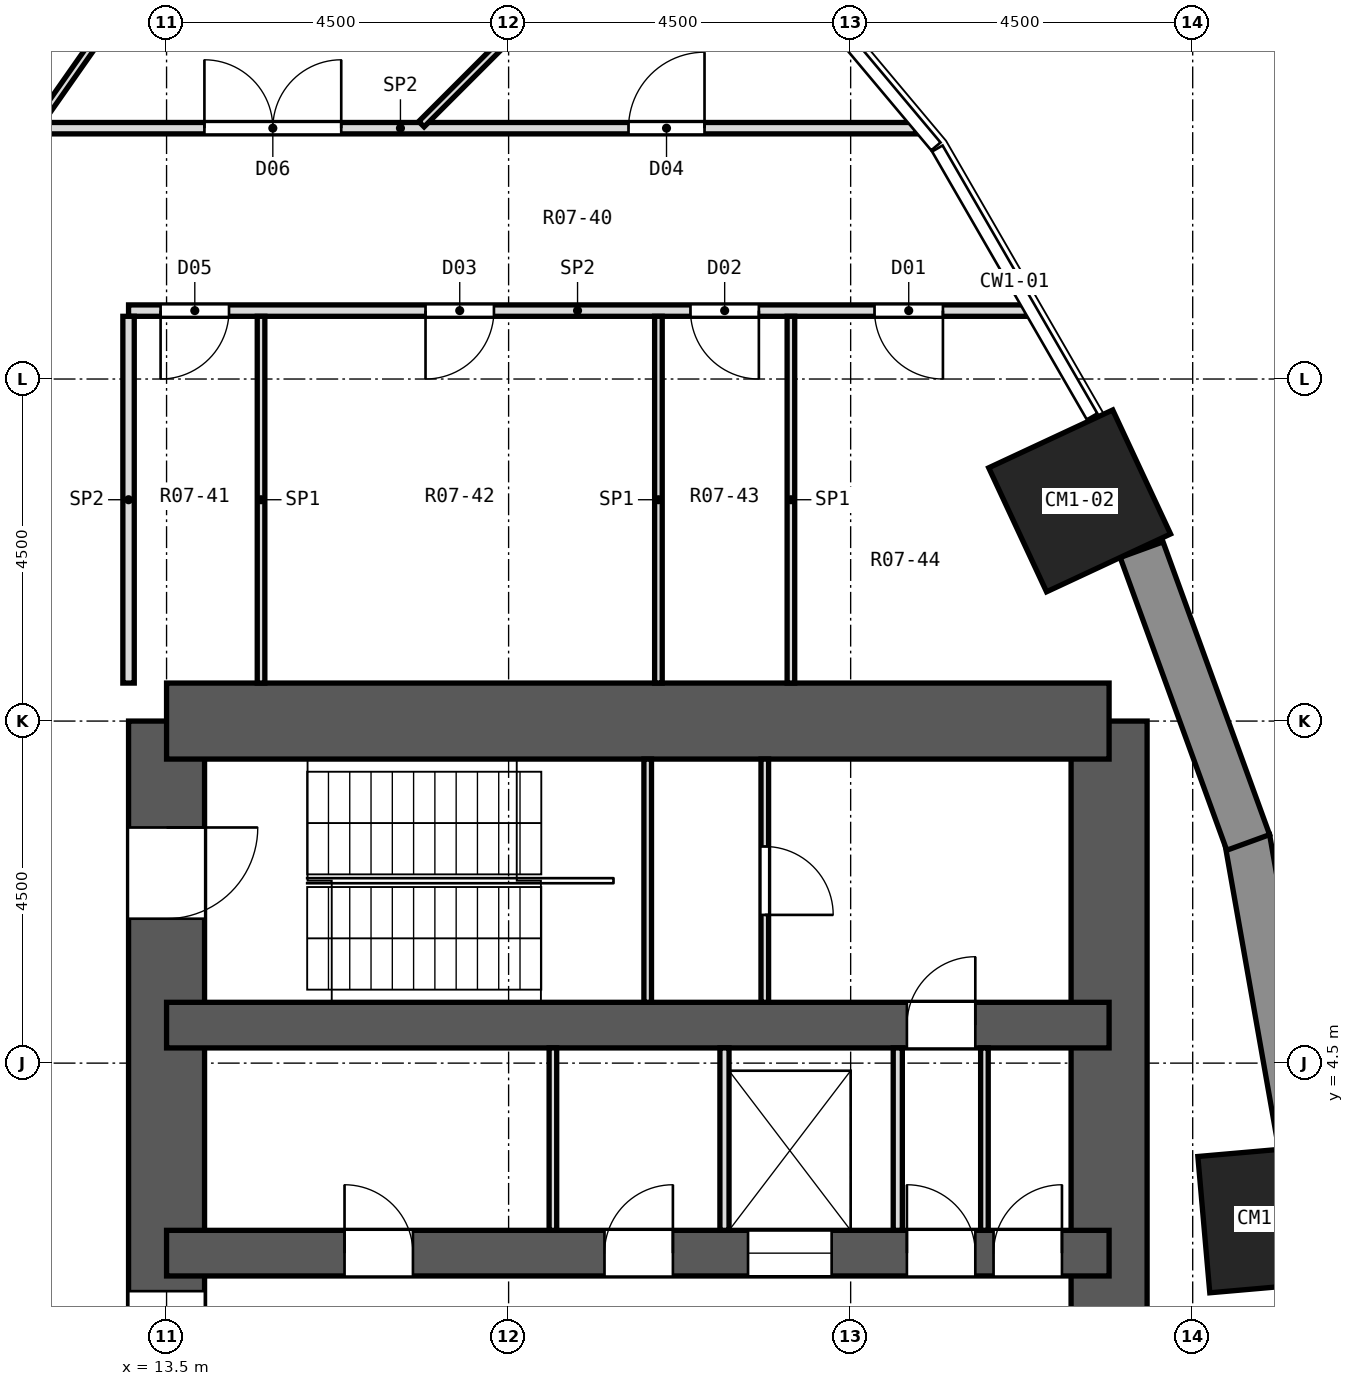
"""IFC4 building model, lengths in metres.
Left out: names, types, materials, properties, quantities, classifications, styles, units other than length and angle.
Written with IfcOpenShell. Run it as: python <this file> out.ifc"""

import sys

from ifc_helpers import new_model, si_unit, direction, frame, frame_2d, origin, origin_2d, place, context, subcontext, project, spatial, rectangle, extrude, element, fill, save


model = new_model("IFC4")
c1 = context("Model", 3, precision=1e-05, world=origin(), true_north=direction((0.0, 1.0)))
c2 = subcontext(c1, "Body", "Model", "MODEL_VIEW")
j1 = project(units=[si_unit("LENGTHUNIT", "METRE"), si_unit("PLANEANGLEUNIT", "RADIAN")], contexts=[c1])
p1 = place(None, origin())
s1 = spatial("IfcSite", under=j1, at=p1, CompositionType="ELEMENT")
p2 = place(p1, origin())
s2 = spatial("IfcBuilding", under=s1, at=p2, CompositionType="ELEMENT")
p3 = place(p2, frame((0.0, 0.0, 17.6)))
s3 = spatial("IfcBuildingStorey", under=s2, at=p3, CompositionType="ELEMENT", Elevation=17.6)
for number, where, z_axis, x_axis in (
    (1, (28.043, 2.453, 0.0), (0.0, 0.0, 1.0), (0.996, 0.087, 0.0)),
    (2, (25.512, 11.897, 0.0), (0.0, 0.0, 1.0), (0.906, 0.423, 0.0)),
):
    element("IfcColumn", number, at=place(p3, frame(where, z_axis=z_axis, x_axis=x_axis)), inside=s3, PredefinedType="COLUMN", context=c2, shape_type="SweptSolid", body=[
        extrude(rectangle(XDim=1.8, YDim=1.8, at=origin_2d()), origin(), (0.0, 0.0, 1.0), 4.2),
    ])
p4 = place(p3, frame((13.5, -9.0, 0.0), z_axis=(0.0, 0.0, 1.0), x_axis=(0.0, 1.0, 0.0)))
e3 = element("IfcWall", 3, at=p4, inside=s3, PredefinedType="SHEAR", context=c2, shape_type="SweptSolid", body=[
    extrude(rectangle(XDim=18.0, YDim=1.0, at=frame_2d((9.0, 0.0))), origin(), (0.0, 0.0, 1.0), 4.2),
])
p5 = place(p4, frame((15.4, 0.0, 0.0)))
e4 = element("IfcOpeningElement", 4, at=p5, cuts=e3, PredefinedType="OPENING", context=c2, shape_type="SweptSolid", body=[
    extrude(rectangle(XDim=1.2, YDim=2.1, at=frame_2d((0.6, 1.05))), frame((0.0, 0.512, 0.0), z_axis=(0.0, -1.0, 0.0), x_axis=(1.0, 0.0, 0.0)), (0.0, 0.0, 1.0), 1.024),
])
p6 = place(p4, frame((1.4, 0.0, 0.0)))
e5 = element("IfcOpeningElement", 5, at=p6, cuts=e3, PredefinedType="OPENING", context=c2, shape_type="SweptSolid", body=[
    extrude(rectangle(XDim=1.2, YDim=2.1, at=frame_2d((0.6, 1.05))), frame((0.0, 0.512, 0.0), z_axis=(0.0, -1.0, 0.0), x_axis=(1.0, 0.0, 0.0)), (0.0, 0.0, 1.0), 1.024),
])
p7 = place(p4, frame((7.5, 0.0, 0.0)))
e6 = element("IfcOpeningElement", 6, at=p7, cuts=e3, PredefinedType="OPENING", context=c2, shape_type="SweptSolid", body=[
    extrude(rectangle(XDim=3.0, YDim=2.4, at=frame_2d((1.5, 1.2))), frame((0.0, 0.512, 0.0), z_axis=(0.0, -1.0, 0.0), x_axis=(1.0, 0.0, 0.0)), (0.0, 0.0, 1.0), 1.024),
])
p8 = place(p3, frame((25.9, -9.0, 0.0), z_axis=(0.0, 0.0, 1.0), x_axis=(0.0, 1.0, 0.0)))
e7 = element("IfcWall", 7, at=p8, inside=s3, PredefinedType="SHEAR", context=c2, shape_type="SweptSolid", body=[
    extrude(rectangle(XDim=18.0, YDim=1.0, at=frame_2d((9.0, 0.0))), origin(), (0.0, 0.0, 1.0), 4.2),
])
p9 = place(p3, frame((13.5, 9.0, 0.0), z_axis=(0.0, 0.0, 1.0), x_axis=(1.0, 0.0, 0.0)))
e8 = element("IfcWall", 8, at=p9, inside=s3, PredefinedType="SHEAR", context=c2, shape_type="SweptSolid", body=[
    extrude(rectangle(XDim=12.4, YDim=1.0, at=frame_2d((6.2, 0.0))), origin(), (0.0, 0.0, 1.0), 4.2),
])
p10 = place(p3, frame((13.5, 5.0, 0.0), z_axis=(0.0, 0.0, 1.0), x_axis=(1.0, 0.0, 0.0)))
e9 = element("IfcWall", 9, at=p10, inside=s3, PredefinedType="SHEAR", context=c2, shape_type="SweptSolid", body=[
    extrude(rectangle(XDim=12.4, YDim=0.6, at=frame_2d((6.2, 0.0))), origin(), (0.0, 0.0, 1.0), 4.2),
])
p11 = place(p10, frame((9.74, 0.0, 0.0)))
e10 = element("IfcOpeningElement", 10, at=p11, cuts=e9, PredefinedType="OPENING", context=c2, shape_type="SweptSolid", body=[
    extrude(rectangle(XDim=0.9, YDim=2.1, at=frame_2d((0.45, 1.05))), frame((0.0, 0.312, 0.0), z_axis=(0.0, -1.0, 0.0), x_axis=(1.0, 0.0, 0.0)), (0.0, 0.0, 1.0), 0.624),
])
p12 = place(p3, frame((13.5, 2.0, 0.0), z_axis=(0.0, 0.0, 1.0), x_axis=(1.0, 0.0, 0.0)))
e11 = element("IfcWall", 11, at=p12, inside=s3, PredefinedType="SHEAR", context=c2, shape_type="SweptSolid", body=[
    extrude(rectangle(XDim=12.4, YDim=0.6, at=frame_2d((6.2, 0.0))), origin(), (0.0, 0.0, 1.0), 4.2),
])
p13 = place(p12, frame((7.65, 0.0, 0.0)))
e12 = element("IfcOpeningElement", 12, at=p13, cuts=e11, PredefinedType="OPENING", context=c2, shape_type="SweptSolid", body=[
    extrude(rectangle(XDim=1.1, YDim=2.1, at=frame_2d((0.55, 1.05))), frame((0.0, 0.312, 0.0), z_axis=(0.0, -1.0, 0.0), x_axis=(1.0, 0.0, 0.0)), (0.0, 0.0, 1.0), 0.624),
])
p14 = place(p12, frame((2.341, 0.0, 0.0)))
e13 = element("IfcOpeningElement", 13, at=p14, cuts=e11, PredefinedType="OPENING", context=c2, shape_type="SweptSolid", body=[
    extrude(rectangle(XDim=0.9, YDim=2.1, at=frame_2d((0.45, 1.05))), frame((0.0, 0.312, 0.0), z_axis=(0.0, -1.0, 0.0), x_axis=(1.0, 0.0, 0.0)), (0.0, 0.0, 1.0), 0.624),
])
p15 = place(p12, frame((5.761, 0.0, 0.0)))
e14 = element("IfcOpeningElement", 14, at=p15, cuts=e11, PredefinedType="OPENING", context=c2, shape_type="SweptSolid", body=[
    extrude(rectangle(XDim=0.9, YDim=2.1, at=frame_2d((0.45, 1.05))), frame((0.0, 0.312, 0.0), z_axis=(0.0, -1.0, 0.0), x_axis=(1.0, 0.0, 0.0)), (0.0, 0.0, 1.0), 0.624),
])
p16 = place(p12, frame((9.74, 0.0, 0.0)))
e15 = element("IfcOpeningElement", 15, at=p16, cuts=e11, PredefinedType="OPENING", context=c2, shape_type="SweptSolid", body=[
    extrude(rectangle(XDim=0.9, YDim=2.1, at=frame_2d((0.45, 1.05))), frame((0.0, 0.312, 0.0), z_axis=(0.0, -1.0, 0.0), x_axis=(1.0, 0.0, 0.0)), (0.0, 0.0, 1.0), 0.624),
])
p17 = place(p12, frame((10.88, 0.0, 0.0)))
e16 = element("IfcOpeningElement", 16, at=p17, cuts=e11, PredefinedType="OPENING", context=c2, shape_type="SweptSolid", body=[
    extrude(rectangle(XDim=0.9, YDim=2.1, at=frame_2d((0.45, 1.05))), frame((0.0, 0.312, 0.0), z_axis=(0.0, -1.0, 0.0), x_axis=(1.0, 0.0, 0.0)), (0.0, 0.0, 1.0), 0.624),
])
p18 = place(p3, frame((28.428, 3.417, 0.0), z_axis=(0.0, 0.0, 1.0), x_axis=(-0.173673210505, 0.984803338719, 0.0)))
e17 = element("IfcWall", 17, at=p18, inside=s3, PredefinedType="SOLIDWALL", context=c2, shape_type="SweptSolid", body=[
    extrude(rectangle(XDim=4.099, YDim=0.6, at=frame_2d((2.05, 0.0))), origin(), (0.0, 0.0, 1.0), 3.6),
])
p19 = place(p3, frame((27.73, 7.403, 0.0), z_axis=(0.0, 0.0, 1.0), x_axis=(-0.342034744565, 0.939687306241, 0.0)))
e18 = element("IfcWall", 18, at=p19, inside=s3, PredefinedType="SOLIDWALL", context=c2, shape_type="SweptSolid", body=[
    extrude(rectangle(XDim=4.099, YDim=0.6, at=frame_2d((2.05, 0.0))), origin(), (0.0, 0.0, 1.0), 3.6),
])
p20 = place(p3, frame((13.0, 14.4, 0.0), z_axis=(0.0, 0.0, 1.0), x_axis=(1.0, 0.0, 0.0)))
e19 = element("IfcWall", 19, at=p20, inside=s3, PredefinedType="PARTITIONING", context=c2, shape_type="SweptSolid", body=[
    extrude(rectangle(XDim=11.814, YDim=0.15, at=frame_2d((5.907, 0.0))), origin(), (0.0, 0.0, 1.0), 3.6),
])
p21 = place(p20, frame((9.814, 0.0, 0.0)))
e20 = element("IfcOpeningElement", 20, at=p21, cuts=e19, PredefinedType="OPENING", context=c2, shape_type="SweptSolid", body=[
    extrude(rectangle(XDim=0.9, YDim=2.1, at=frame_2d((0.45, 1.05))), frame((0.0, 0.087, 0.0), z_axis=(0.0, -1.0, 0.0), x_axis=(1.0, 0.0, 0.0)), (0.0, 0.0, 1.0), 0.174),
])
p22 = place(p20, frame((7.393, 0.0, 0.0)))
e21 = element("IfcOpeningElement", 21, at=p22, cuts=e19, PredefinedType="OPENING", context=c2, shape_type="SweptSolid", body=[
    extrude(rectangle(XDim=0.9, YDim=2.1, at=frame_2d((0.45, 1.05))), frame((0.0, 0.087, 0.0), z_axis=(0.0, -1.0, 0.0), x_axis=(1.0, 0.0, 0.0)), (0.0, 0.0, 1.0), 0.174),
])
p23 = place(p20, frame((3.907, 0.0, 0.0)))
e22 = element("IfcOpeningElement", 22, at=p23, cuts=e19, PredefinedType="OPENING", context=c2, shape_type="SweptSolid", body=[
    extrude(rectangle(XDim=0.9, YDim=2.1, at=frame_2d((0.45, 1.05))), frame((0.0, 0.087, 0.0), z_axis=(0.0, -1.0, 0.0), x_axis=(1.0, 0.0, 0.0)), (0.0, 0.0, 1.0), 0.174),
])
p24 = place(p20, frame((0.421, 0.0, 0.0)))
e23 = element("IfcOpeningElement", 23, at=p24, cuts=e19, PredefinedType="OPENING", context=c2, shape_type="SweptSolid", body=[
    extrude(rectangle(XDim=0.9, YDim=2.1, at=frame_2d((0.45, 1.05))), frame((0.0, 0.087, 0.0), z_axis=(0.0, -1.0, 0.0), x_axis=(1.0, 0.0, 0.0)), (0.0, 0.0, 1.0), 0.174),
])
p25 = place(p3, frame((9.8, 16.8, 0.0), z_axis=(0.0, 0.0, 1.0), x_axis=(1.0, 0.0, 0.0)))
e24 = element("IfcWall", 24, at=p25, inside=s3, PredefinedType="PARTITIONING", context=c2, shape_type="SweptSolid", body=[
    extrude(rectangle(XDim=13.555, YDim=0.15, at=frame_2d((6.777, 0.0))), origin(), (0.0, 0.0, 1.0), 3.6),
])
p26 = place(p25, frame((9.778, 0.0, 0.0)))
e25 = element("IfcOpeningElement", 25, at=p26, cuts=e24, PredefinedType="OPENING", context=c2, shape_type="SweptSolid", body=[
    extrude(rectangle(XDim=1.0, YDim=2.1, at=frame_2d((0.5, 1.05))), frame((0.0, 0.087, 0.0), z_axis=(0.0, -1.0, 0.0), x_axis=(1.0, 0.0, 0.0)), (0.0, 0.0, 1.0), 0.174),
])
p27 = place(p25, frame((4.198, 0.0, 0.0)))
e26 = element("IfcOpeningElement", 26, at=p27, cuts=e24, PredefinedType="OPENING", context=c2, shape_type="SweptSolid", body=[
    extrude(rectangle(XDim=1.8, YDim=2.1, at=frame_2d((0.9, 1.05))), frame((0.0, 0.087, 0.0), z_axis=(0.0, -1.0, 0.0), x_axis=(1.0, 0.0, 0.0)), (0.0, 0.0, 1.0), 0.174),
])
p28 = place(p3, frame((16.853, 16.853, 0.0), z_axis=(0.0, 0.0, 1.0), x_axis=(0.707106781187, 0.707106781187, 0.0)))
e27 = element("IfcWall", 27, at=p28, inside=s3, PredefinedType="PARTITIONING", context=c2, shape_type="SweptSolid", body=[
    extrude(rectangle(XDim=3.406, YDim=0.1, at=frame_2d((1.703, 0.0))), origin(), (0.0, 0.0, 1.0), 3.6),
])
p29 = place(p3, frame((11.806, 16.861, 0.0), z_axis=(0.0, 0.0, 1.0), x_axis=(0.573651788308, 0.819099277115, 0.0)))
e28 = element("IfcWall", 28, at=p29, inside=s3, PredefinedType="PARTITIONING", context=c2, shape_type="SweptSolid", body=[
    extrude(rectangle(XDim=8.216, YDim=0.1, at=frame_2d((4.108, 0.0))), origin(), (0.0, 0.0, 1.0), 3.6),
])
p30 = place(p29, frame((3.57, 0.0, 0.0)))
e29 = element("IfcOpeningElement", 29, at=p30, cuts=e28, PredefinedType="OPENING", context=c2, shape_type="SweptSolid", body=[
    extrude(rectangle(XDim=1.0, YDim=2.1, at=frame_2d((0.5, 1.05))), frame((0.0, 0.062, 0.0), z_axis=(0.0, -1.0, 0.0), x_axis=(1.0, 0.0, 0.0)), (0.0, 0.0, 1.0), 0.124),
])
for number, where, z_axis, x_axis in (
    (30, (21.714, 9.5, 0.0), (0.0, 0.0, 1.0), (0.0, 1.0, 0.0)),
    (31, (19.971, 9.5, 0.0), (0.0, 0.0, 1.0), (0.0, 1.0, 0.0)),
    (32, (14.743, 9.5, 0.0), (0.0, 0.0, 1.0), (0.0, 1.0, 0.0)),
):
    element("IfcWall", number, at=place(p3, frame(where, z_axis=z_axis, x_axis=x_axis)), inside=s3, PredefinedType="PARTITIONING", context=c2, shape_type="SweptSolid", body=[
        extrude(rectangle(XDim=4.825, YDim=0.1, at=frame_2d((2.413, 0.0))), origin(), (0.0, 0.0, 1.0), 3.6),
    ])
p31 = place(p3, frame((13.0, 9.5, 0.0), z_axis=(0.0, 0.0, 1.0), x_axis=(0.0, 1.0, 0.0)))
e33 = element("IfcWall", 33, at=p31, inside=s3, PredefinedType="PARTITIONING", context=c2, shape_type="SweptSolid", body=[
    extrude(rectangle(XDim=4.825, YDim=0.15, at=frame_2d((2.413, 0.0))), origin(), (0.0, 0.0, 1.0), 3.6),
])
p32 = place(p3, frame((18.583, 2.3, 0.0), z_axis=(0.0, 0.0, 1.0), x_axis=(0.0, 1.0, 0.0)))
e34 = element("IfcWall", 34, at=p32, inside=s3, PredefinedType="PARTITIONING", context=c2, shape_type="SweptSolid", body=[
    extrude(rectangle(XDim=2.4, YDim=0.1, at=frame_2d((1.2, 0.0))), origin(), (0.0, 0.0, 1.0), 3.6),
])
for number, where, z_axis, x_axis in (
    (35, (20.84, 2.3, 0.0), (0.0, 0.0, 1.0), (0.0, 1.0, 0.0)),
    (36, (23.12, 2.3, 0.0), (0.0, 0.0, 1.0), (0.0, 1.0, 0.0)),
):
    element("IfcWall", number, at=place(p3, frame(where, z_axis=z_axis, x_axis=x_axis)), inside=s3, PredefinedType="PARTITIONING", context=c2, shape_type="SweptSolid", body=[
        extrude(rectangle(XDim=2.4, YDim=0.12, at=frame_2d((1.2, 0.0))), origin(), (0.0, 0.0, 1.0), 3.6),
    ])
p33 = place(p3, frame((24.26, 2.3, 0.0), z_axis=(0.0, 0.0, 1.0), x_axis=(0.0, 1.0, 0.0)))
e37 = element("IfcWall", 37, at=p33, inside=s3, PredefinedType="PARTITIONING", context=c2, shape_type="SweptSolid", body=[
    extrude(rectangle(XDim=2.4, YDim=0.1, at=frame_2d((1.2, 0.0))), origin(), (0.0, 0.0, 1.0), 3.6),
])
p34 = place(p3, frame((19.83, 5.3, 0.0), z_axis=(0.0, 0.0, 1.0), x_axis=(0.0, 1.0, 0.0)))
e38 = element("IfcWall", 38, at=p34, inside=s3, PredefinedType="PARTITIONING", context=c2, shape_type="SweptSolid", body=[
    extrude(rectangle(XDim=3.2, YDim=0.1, at=frame_2d((1.6, 0.0))), origin(), (0.0, 0.0, 1.0), 3.6),
])
p35 = place(p3, frame((21.37, 5.3, 0.0), z_axis=(0.0, 0.0, 1.0), x_axis=(0.0, 1.0, 0.0)))
e39 = element("IfcWall", 39, at=p35, inside=s3, PredefinedType="PARTITIONING", context=c2, shape_type="SweptSolid", body=[
    extrude(rectangle(XDim=3.2, YDim=0.1, at=frame_2d((1.6, 0.0))), origin(), (0.0, 0.0, 1.0), 3.6),
])
p36 = place(p35, frame((1.15, 0.0, 0.0)))
e40 = element("IfcOpeningElement", 40, at=p36, cuts=e39, PredefinedType="OPENING", context=c2, shape_type="SweptSolid", body=[
    extrude(rectangle(XDim=0.9, YDim=2.1, at=frame_2d((0.45, 1.05))), frame((0.0, 0.062, 0.0), z_axis=(0.0, -1.0, 0.0), x_axis=(1.0, 0.0, 0.0)), (0.0, 0.0, 1.0), 0.124),
])
p37 = place(p21, frame((0.9, 0.0, 0.0), z_axis=(0.0, 0.0, 1.0), x_axis=(-1.0, 0.0, 0.0)))
e41 = element("IfcDoor", 41, at=p37, inside=s3, OperationType="SINGLE_SWING_LEFT", PredefinedType="DOOR", context=c2, shape_type="SweptSolid", body=[
    extrude(rectangle(XDim=0.9, YDim=2.1, at=frame_2d((0.45, 1.05))), frame((0.0, 0.025, 0.0), z_axis=(0.0, -1.0, 0.0), x_axis=(1.0, 0.0, 0.0)), (0.0, 0.0, 1.0), 0.05),
])
fill(e20, e41)
p38 = place(p22, frame((0.9, 0.0, 0.0), z_axis=(0.0, 0.0, 1.0), x_axis=(-1.0, 0.0, 0.0)))
e42 = element("IfcDoor", 42, at=p38, inside=s3, OperationType="SINGLE_SWING_LEFT", PredefinedType="DOOR", context=c2, shape_type="SweptSolid", body=[
    extrude(rectangle(XDim=0.9, YDim=2.1, at=frame_2d((0.45, 1.05))), frame((0.0, 0.025, 0.0), z_axis=(0.0, -1.0, 0.0), x_axis=(1.0, 0.0, 0.0)), (0.0, 0.0, 1.0), 0.05),
])
fill(e21, e42)
p39 = place(p23, frame((0.9, 0.0, 0.0), z_axis=(0.0, 0.0, 1.0), x_axis=(-1.0, 0.0, 0.0)))
e43 = element("IfcDoor", 43, at=p39, inside=s3, OperationType="SINGLE_SWING_RIGHT", PredefinedType="DOOR", context=c2, shape_type="SweptSolid", body=[
    extrude(rectangle(XDim=0.9, YDim=2.1, at=frame_2d((0.45, 1.05))), frame((0.0, 0.025, 0.0), z_axis=(0.0, -1.0, 0.0), x_axis=(1.0, 0.0, 0.0)), (0.0, 0.0, 1.0), 0.05),
])
fill(e22, e43)
p40 = place(p26, origin())
e44 = element("IfcDoor", 44, at=p40, inside=s3, OperationType="SINGLE_SWING_RIGHT", PredefinedType="DOOR", context=c2, shape_type="SweptSolid", body=[
    extrude(rectangle(XDim=1.0, YDim=2.1, at=frame_2d((0.5, 1.05))), frame((0.0, 0.025, 0.0), z_axis=(0.0, -1.0, 0.0), x_axis=(1.0, 0.0, 0.0)), (0.0, 0.0, 1.0), 0.05),
])
fill(e25, e44)
p41 = place(p24, frame((0.9, 0.0, 0.0), z_axis=(0.0, 0.0, 1.0), x_axis=(-1.0, 0.0, 0.0)))
e45 = element("IfcDoor", 45, at=p41, inside=s3, OperationType="SINGLE_SWING_RIGHT", PredefinedType="DOOR", context=c2, shape_type="SweptSolid", body=[
    extrude(rectangle(XDim=0.9, YDim=2.1, at=frame_2d((0.45, 1.05))), frame((0.0, 0.025, 0.0), z_axis=(0.0, -1.0, 0.0), x_axis=(1.0, 0.0, 0.0)), (0.0, 0.0, 1.0), 0.05),
])
fill(e23, e45)
p42 = place(p27, origin())
e46 = element("IfcDoor", 46, at=p42, inside=s3, OperationType="DOUBLE_DOOR_SINGLE_SWING", PredefinedType="DOOR", context=c2, shape_type="SweptSolid", body=[
    extrude(rectangle(XDim=1.8, YDim=2.1, at=frame_2d((0.9, 1.05))), frame((0.0, 0.025, 0.0), z_axis=(0.0, -1.0, 0.0), x_axis=(1.0, 0.0, 0.0)), (0.0, 0.0, 1.0), 0.05),
])
fill(e26, e46)
p43 = place(p13, origin())
e47 = element("IfcDoor", 47, at=p43, inside=s3, OperationType="DOUBLE_DOOR_SLIDING", PredefinedType="DOOR", context=c2, shape_type="SweptSolid", body=[
    extrude(rectangle(XDim=1.1, YDim=2.1, at=frame_2d((0.55, 1.05))), frame((0.0, 0.025, 0.0), z_axis=(0.0, -1.0, 0.0), x_axis=(1.0, 0.0, 0.0)), (0.0, 0.0, 1.0), 0.05),
])
fill(e12, e47)
p44 = place(p14, origin())
e48 = element("IfcDoor", 48, at=p44, inside=s3, OperationType="SINGLE_SWING_LEFT", PredefinedType="DOOR", context=c2, shape_type="SweptSolid", body=[
    extrude(rectangle(XDim=0.9, YDim=2.1, at=frame_2d((0.45, 1.05))), frame((0.0, 0.025, 0.0), z_axis=(0.0, -1.0, 0.0), x_axis=(1.0, 0.0, 0.0)), (0.0, 0.0, 1.0), 0.05),
])
fill(e13, e48)
p45 = place(p15, origin())
e49 = element("IfcDoor", 49, at=p45, inside=s3, OperationType="SINGLE_SWING_RIGHT", PredefinedType="DOOR", context=c2, shape_type="SweptSolid", body=[
    extrude(rectangle(XDim=0.9, YDim=2.1, at=frame_2d((0.45, 1.05))), frame((0.0, 0.025, 0.0), z_axis=(0.0, -1.0, 0.0), x_axis=(1.0, 0.0, 0.0)), (0.0, 0.0, 1.0), 0.05),
])
fill(e14, e49)
p46 = place(p16, origin())
e50 = element("IfcDoor", 50, at=p46, inside=s3, OperationType="SINGLE_SWING_LEFT", PredefinedType="DOOR", context=c2, shape_type="SweptSolid", body=[
    extrude(rectangle(XDim=0.9, YDim=2.1, at=frame_2d((0.45, 1.05))), frame((0.0, 0.025, 0.0), z_axis=(0.0, -1.0, 0.0), x_axis=(1.0, 0.0, 0.0)), (0.0, 0.0, 1.0), 0.05),
])
fill(e15, e50)
p47 = place(p17, origin())
e51 = element("IfcDoor", 51, at=p47, inside=s3, OperationType="SINGLE_SWING_RIGHT", PredefinedType="DOOR", context=c2, shape_type="SweptSolid", body=[
    extrude(rectangle(XDim=0.9, YDim=2.1, at=frame_2d((0.45, 1.05))), frame((0.0, 0.025, 0.0), z_axis=(0.0, -1.0, 0.0), x_axis=(1.0, 0.0, 0.0)), (0.0, 0.0, 1.0), 0.05),
])
fill(e16, e51)
p48 = place(p36, frame((0.9, 0.0, 0.0), z_axis=(0.0, 0.0, 1.0), x_axis=(-1.0, 0.0, 0.0)))
e52 = element("IfcDoor", 52, at=p48, inside=s3, OperationType="SINGLE_SWING_RIGHT", PredefinedType="DOOR", context=c2, shape_type="SweptSolid", body=[
    extrude(rectangle(XDim=0.9, YDim=2.1, at=frame_2d((0.45, 1.05))), frame((0.0, 0.025, 0.0), z_axis=(0.0, -1.0, 0.0), x_axis=(1.0, 0.0, 0.0)), (0.0, 0.0, 1.0), 0.05),
])
fill(e40, e52)
p49 = place(p11, origin())
e53 = element("IfcDoor", 53, at=p49, inside=s3, OperationType="SINGLE_SWING_RIGHT", PredefinedType="DOOR", context=c2, shape_type="SweptSolid", body=[
    extrude(rectangle(XDim=0.9, YDim=2.1, at=frame_2d((0.45, 1.05))), frame((0.0, 0.025, 0.0), z_axis=(0.0, -1.0, 0.0), x_axis=(1.0, 0.0, 0.0)), (0.0, 0.0, 1.0), 0.05),
])
fill(e10, e53)
p50 = place(p5, frame((1.2, 0.0, 0.0), z_axis=(0.0, 0.0, 1.0), x_axis=(-1.0, 0.0, 0.0)))
e54 = element("IfcDoor", 54, at=p50, inside=s3, OperationType="SINGLE_SWING_LEFT", PredefinedType="DOOR", context=c2, shape_type="SweptSolid", body=[
    extrude(rectangle(XDim=1.2, YDim=2.1, at=frame_2d((0.6, 1.05))), frame((0.0, 0.025, 0.0), z_axis=(0.0, -1.0, 0.0), x_axis=(1.0, 0.0, 0.0)), (0.0, 0.0, 1.0), 0.05),
])
fill(e4, e54)
p51 = place(p7, origin())
e55 = element("IfcDoor", 55, at=p51, inside=s3, OperationType="DOUBLE_DOOR_SLIDING", PredefinedType="DOOR", context=c2, shape_type="SweptSolid", body=[
    extrude(rectangle(XDim=3.0, YDim=2.4, at=frame_2d((1.5, 1.2))), frame((0.0, 0.025, 0.0), z_axis=(0.0, -1.0, 0.0), x_axis=(1.0, 0.0, 0.0)), (0.0, 0.0, 1.0), 0.05),
])
fill(e6, e55)
save(model, sys.argv[1])
